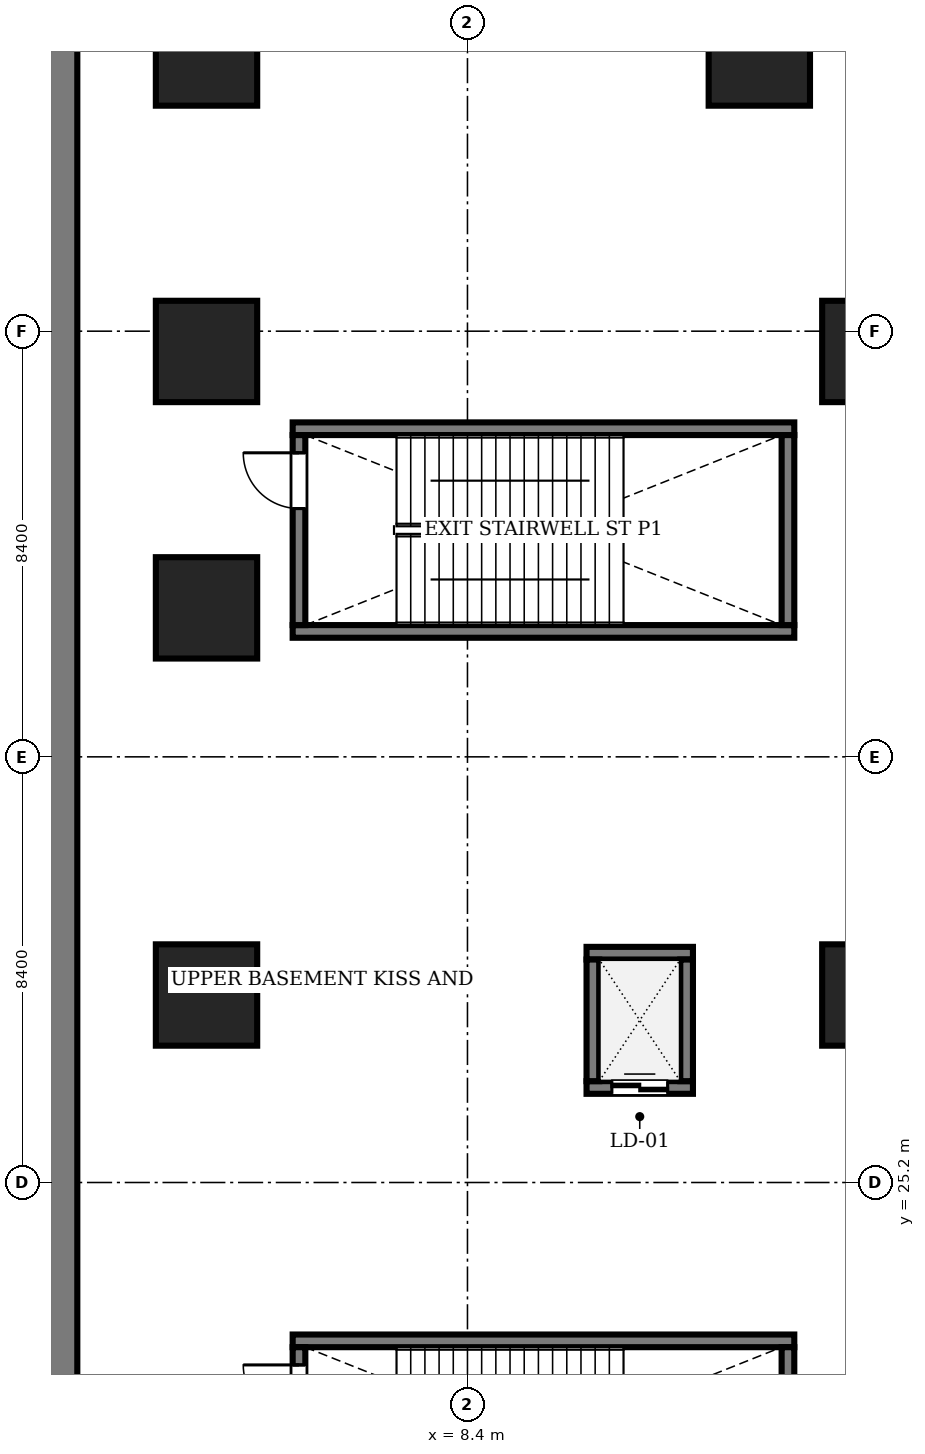
"""IFC4 building model, lengths in metres.
Left out: names, types, materials, properties, quantities, classifications, styles, units other than length and angle.
Written with IfcOpenShell. Run it as: python <this file> out.ifc"""

import sys

from ifc_helpers import new_model, si_unit, direction, frame, frame_2d, origin, origin_2d, place, context, subcontext, project, spatial, rectangle, extrude, source, transform, mapped, element, fill, save


model = new_model("IFC4")
c1 = context("Model", 3, precision=1e-05, world=origin(), true_north=direction((0.0, 1.0)))
c2 = subcontext(c1, "Body", "Model", "MODEL_VIEW")
j1 = project(units=[si_unit("LENGTHUNIT", "METRE"), si_unit("PLANEANGLEUNIT", "RADIAN")], contexts=[c1])
p1 = place(None, origin())
s1 = spatial("IfcSite", under=j1, at=p1, CompositionType="ELEMENT")
p2 = place(p1, origin())
s2 = spatial("IfcBuilding", under=s1, at=p2, CompositionType="ELEMENT")
p3 = place(p2, frame((0.0, 0.0, -6.0)))
s3 = spatial("IfcBuildingStorey", under=s2, at=p3, CompositionType="ELEMENT", Elevation=-6.0)
m1 = source(origin(), c2, "Body", "SweptSolid", [
    extrude(rectangle(XDim=49.0, YDim=0.7, at=frame_2d((24.5, 0.0))), origin(), (0.0, 0.0, 1.0), 5.6),
])
p4 = place(p3, frame((0.35, 0.7, 0.0), z_axis=(0.0, 0.0, 1.0), x_axis=(0.0, 1.0, 0.0)))
e1 = element("IfcWall", 1, at=p4, inside=s3, PredefinedType="SOLIDWALL", context=c2, shape_type="MappedRepresentation", body=[
    mapped(m1, transform((0.0, 0.0, 0.0), scale=1.0)),
])
m2 = source(origin(), c2, "Body", "SweptSolid", [
    extrude(rectangle(XDim=2.0, YDim=2.0, at=origin_2d()), origin(), (0.0, 0.0, 1.0), 5.6),
])
for number, where, z_axis, x_axis in (
    (2, (3.25, 28.9, 0.0), (0.0, 0.0, 1.0), (1.0, 0.0, 0.0)),
    (3, (16.4, 28.9, 0.0), (0.0, 0.0, 1.0), (1.0, 0.0, 0.0)),
    (4, (3.25, 36.54, 0.0), (0.0, 0.0, 1.0), (1.0, 0.0, 0.0)),
    (5, (3.25, 41.6, 0.0), (0.0, 0.0, 1.0), (1.0, 0.0, 0.0)),
    (6, (16.4, 41.6, 0.0), (0.0, 0.0, 1.0), (1.0, 0.0, 0.0)),
    (7, (3.25, 47.45, 0.0), (0.0, 0.0, 1.0), (1.0, 0.0, 0.0)),
    (8, (14.16, 47.45, 0.0), (0.0, 0.0, 1.0), (1.0, 0.0, 0.0)),
):
    element("IfcColumn", number, at=place(p3, frame(where, z_axis=z_axis, x_axis=x_axis)), inside=s3, PredefinedType="COLUMN", context=c2, shape_type="MappedRepresentation", body=[
        mapped(m2, transform((0.0, 0.0, 0.0), scale=1.0)),
    ])
m3 = source(origin(), c2, "Body", "SweptSolid", [
    extrude(rectangle(XDim=9.9, YDim=0.25, at=frame_2d((4.95, 0.0))), origin(), (0.0, 0.0, 1.0), 5.8),
])
p5 = place(p3, frame((4.95, 22.075, 0.0), z_axis=(0.0, 0.0, 1.0), x_axis=(1.0, 0.0, 0.0)))
e9 = element("IfcWall", 9, at=p5, inside=s3, PredefinedType="SOLIDWALL", context=c2, shape_type="MappedRepresentation", body=[
    mapped(m3, transform((0.0, 0.0, 0.0), scale=1.0)),
])
m4 = source(origin(), c2, "Body", "SweptSolid", [
    extrude(rectangle(XDim=3.75, YDim=0.25, at=frame_2d((1.875, 0.0))), origin(), (0.0, 0.0, 1.0), 5.8),
])
p6 = place(p3, frame((14.725, 18.2, 0.0), z_axis=(0.0, 0.0, 1.0), x_axis=(0.0, 1.0, 0.0)))
e10 = element("IfcWall", 10, at=p6, inside=s3, PredefinedType="SOLIDWALL", context=c2, shape_type="MappedRepresentation", body=[
    mapped(m4, transform((0.0, 0.0, 0.0), scale=1.0)),
])
p7 = place(p3, frame((5.075, 18.2, 0.0), z_axis=(0.0, 0.0, 1.0), x_axis=(0.0, 1.0, 0.0)))
e11 = element("IfcWall", 11, at=p7, inside=s3, PredefinedType="SOLIDWALL", context=c2, shape_type="MappedRepresentation", body=[
    mapped(m4, transform((0.0, 0.0, 0.0), scale=1.0)),
])
m5 = source(origin(), c2, "Body", "SweptSolid", [
    extrude(rectangle(XDim=1.1, YDim=2.2, at=frame_2d((0.55, 1.1))), frame((0.0, 0.135, 0.0), z_axis=(0.0, -1.0, 0.0), x_axis=(1.0, 0.0, 0.0)), (0.0, 0.0, 1.0), 0.27),
])
p8 = place(p7, frame((2.3, 0.0, 0.0)))
e12 = element("IfcOpeningElement", 12, at=p8, cuts=e11, PredefinedType="OPENING", context=c2, shape_type="MappedRepresentation", body=[
    mapped(m5, transform((0.0, 0.0, 0.0), scale=1.0)),
])
for number, where, z_axis, x_axis in (
    (13, (4.95, 36.075, 0.0), (0.0, 0.0, 1.0), (1.0, 0.0, 0.0)),
    (14, (4.95, 40.075, 0.0), (0.0, 0.0, 1.0), (1.0, 0.0, 0.0)),
):
    element("IfcWall", number, at=place(p3, frame(where, z_axis=z_axis, x_axis=x_axis)), inside=s3, PredefinedType="SOLIDWALL", context=c2, shape_type="MappedRepresentation", body=[
        mapped(m3, transform((0.0, 0.0, 0.0), scale=1.0)),
    ])
p9 = place(p3, frame((14.725, 36.2, 0.0), z_axis=(0.0, 0.0, 1.0), x_axis=(0.0, 1.0, 0.0)))
e15 = element("IfcWall", 15, at=p9, inside=s3, PredefinedType="SOLIDWALL", context=c2, shape_type="MappedRepresentation", body=[
    mapped(m4, transform((0.0, 0.0, 0.0), scale=1.0)),
])
p10 = place(p3, frame((5.075, 36.2, 0.0), z_axis=(0.0, 0.0, 1.0), x_axis=(0.0, 1.0, 0.0)))
e16 = element("IfcWall", 16, at=p10, inside=s3, PredefinedType="SOLIDWALL", context=c2, shape_type="MappedRepresentation", body=[
    mapped(m4, transform((0.0, 0.0, 0.0), scale=1.0)),
])
p11 = place(p10, frame((2.3, 0.0, 0.0)))
e17 = element("IfcOpeningElement", 17, at=p11, cuts=e16, PredefinedType="OPENING", context=c2, shape_type="MappedRepresentation", body=[
    mapped(m5, transform((0.0, 0.0, 0.0), scale=1.0)),
])
m6 = source(origin(), c2, "Body", "SweptSolid", [
    extrude(rectangle(XDim=2.1, YDim=0.25, at=frame_2d((1.05, 0.0))), origin(), (0.0, 0.0, 1.0), 5.6),
])
p12 = place(p3, frame((10.75, 27.075, 0.0), z_axis=(0.0, 0.0, 1.0), x_axis=(1.0, 0.0, 0.0)))
e18 = element("IfcWall", 18, at=p12, inside=s3, PredefinedType="SOLIDWALL", context=c2, shape_type="MappedRepresentation", body=[
    mapped(m6, transform((0.0, 0.0, 0.0), scale=1.0)),
])
p13 = place(p12, frame((0.5, 0.0, 0.0)))
e19 = element("IfcOpeningElement", 19, at=p13, cuts=e18, PredefinedType="OPENING", context=c2, shape_type="MappedRepresentation", body=[
    mapped(m5, transform((0.0, 0.0, 0.0), scale=1.0)),
])
p14 = place(p3, frame((10.75, 29.725, 0.0), z_axis=(0.0, 0.0, 1.0), x_axis=(1.0, 0.0, 0.0)))
e20 = element("IfcWall", 20, at=p14, inside=s3, PredefinedType="SOLIDWALL", context=c2, shape_type="MappedRepresentation", body=[
    mapped(m6, transform((0.0, 0.0, 0.0), scale=1.0)),
])
m7 = source(origin(), c2, "Body", "SweptSolid", [
    extrude(rectangle(XDim=2.4, YDim=0.25, at=frame_2d((1.2, 0.0))), origin(), (0.0, 0.0, 1.0), 5.6),
])
for number, where, z_axis, x_axis in (
    (21, (10.875, 27.2, 0.0), (0.0, 0.0, 1.0), (0.0, 1.0, 0.0)),
    (22, (12.725, 27.2, 0.0), (0.0, 0.0, 1.0), (0.0, 1.0, 0.0)),
):
    element("IfcWall", number, at=place(p3, frame(where, z_axis=z_axis, x_axis=x_axis)), inside=s3, PredefinedType="SOLIDWALL", context=c2, shape_type="MappedRepresentation", body=[
        mapped(m7, transform((0.0, 0.0, 0.0), scale=1.0)),
    ])
m8 = source(origin(), c2, "Body", "SweptSolid", [
    extrude(rectangle(XDim=1.1, YDim=2.2, at=frame_2d((0.55, 1.1))), frame((0.0, 0.025, 0.0), z_axis=(0.0, -1.0, 0.0), x_axis=(1.0, 0.0, 0.0)), (0.0, 0.0, 1.0), 0.05),
])
p15 = place(p8, origin())
e23 = element("IfcDoor", 23, at=p15, inside=s3, OperationType="SINGLE_SWING_RIGHT", PredefinedType="DOOR", context=c2, shape_type="MappedRepresentation", body=[
    mapped(m8, transform((0.0, 0.0, 0.0), scale=1.0)),
])
fill(e12, e23)
p16 = place(p11, origin())
e24 = element("IfcDoor", 24, at=p16, inside=s3, OperationType="SINGLE_SWING_RIGHT", PredefinedType="DOOR", context=c2, shape_type="MappedRepresentation", body=[
    mapped(m8, transform((0.0, 0.0, 0.0), scale=1.0)),
])
fill(e17, e24)
p17 = place(p13, origin())
e25 = element("IfcDoor", 25, at=p17, inside=s3, OperationType="DOUBLE_DOOR_SLIDING", PredefinedType="DOOR", context=c2, shape_type="MappedRepresentation", body=[
    mapped(m8, transform((0.0, 0.0, 0.0), scale=1.0)),
])
fill(e19, e25)
save(model, sys.argv[1])
